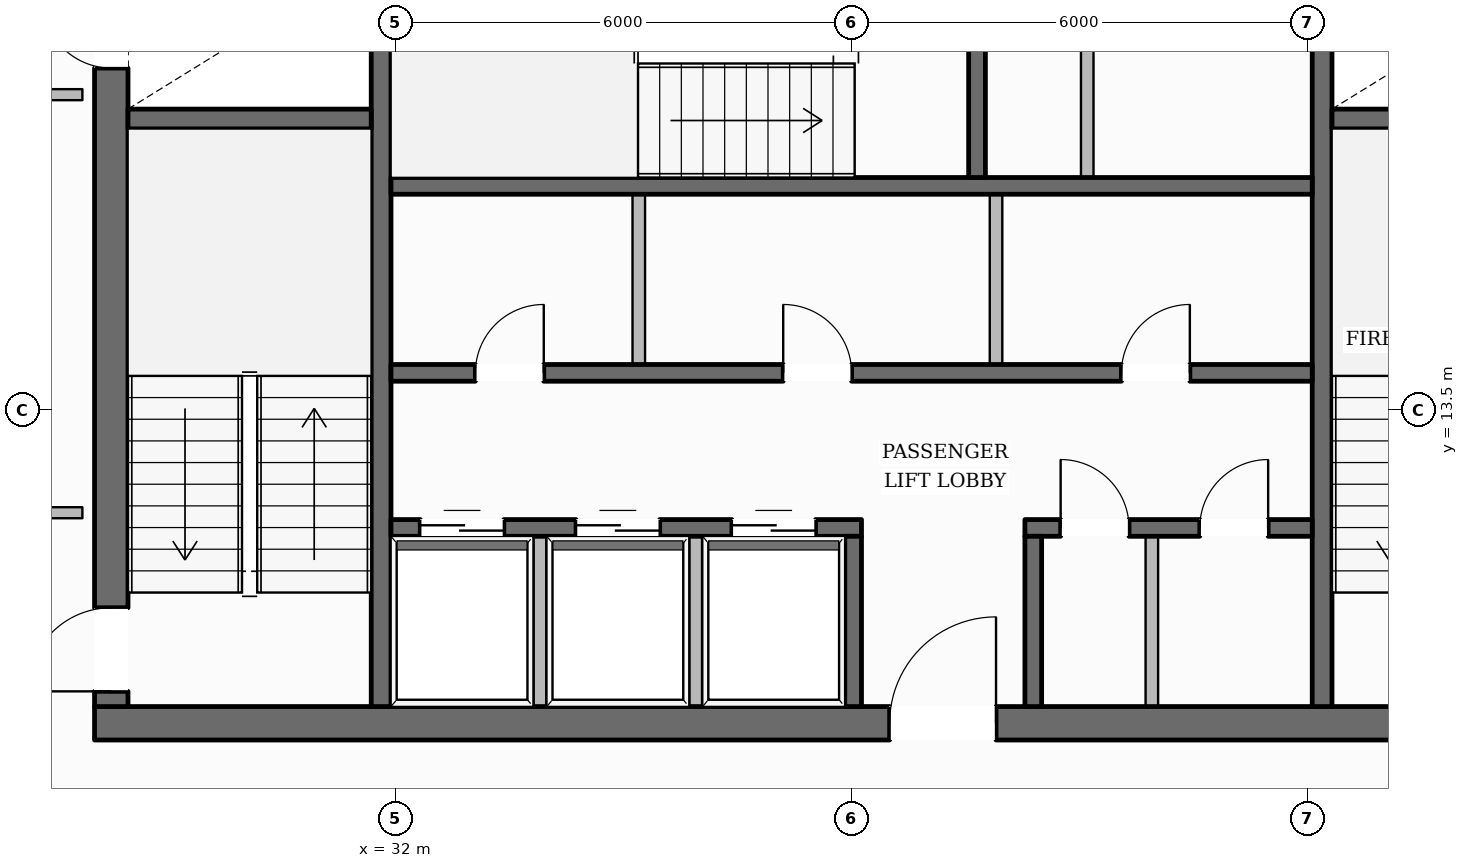
"""IFC4 building model, lengths in metres.
Left out: names, types, materials, properties, quantities, classifications, styles, units other than length and angle.
Written with IfcOpenShell. Run it as: python <this file> out.ifc"""

import sys

from ifc_helpers import new_model, si_unit, direction, frame, frame_2d, origin, place, context, subcontext, project, spatial, rectangle, extrude, element, fill, save


model = new_model("IFC4")
c1 = context("Model", 3, precision=1e-05, world=origin(), true_north=direction((0.0, 1.0)))
c2 = subcontext(c1, "Body", "Model", "MODEL_VIEW")
j1 = project(units=[si_unit("LENGTHUNIT", "METRE"), si_unit("PLANEANGLEUNIT", "RADIAN")], contexts=[c1])
p1 = place(None, origin())
s1 = spatial("IfcSite", under=j1, at=p1, CompositionType="ELEMENT")
p2 = place(p1, origin())
s2 = spatial("IfcBuilding", under=s1, at=p2, CompositionType="ELEMENT")
p3 = place(p2, frame((0.0, 0.0, 172.7)))
s3 = spatial("IfcBuildingStorey", under=s2, at=p3, CompositionType="ELEMENT", Elevation=172.7)
p4 = place(p3, frame((28.04, 9.38, 0.0), z_axis=(0.0, 0.0, 1.0), x_axis=(1.0, 0.0, 0.0)))
e1 = element("IfcWall", 1, at=p4, inside=s3, PredefinedType="SOLIDWALL", context=c2, shape_type="SweptSolid", body=[
    extrude(rectangle(XDim=19.92, YDim=0.44, at=frame_2d((9.96, 0.0))), origin(), (0.0, 0.0, 1.0), 3.6),
])
p5 = place(p4, frame((10.46, 0.0, 0.0)))
e2 = element("IfcOpeningElement", 2, at=p5, cuts=e1, PredefinedType="OPENING", context=c2, shape_type="SweptSolid", body=[
    extrude(rectangle(XDim=1.4, YDim=2.2, at=frame_2d((0.7, 1.1))), frame((0.0, 0.23, 0.0), z_axis=(0.0, -1.0, 0.0), x_axis=(1.0, 0.0, 0.0)), (0.0, 0.0, 1.0), 0.46),
])
p6 = place(p3, frame((28.26, 9.6, 0.0), z_axis=(0.0, 0.0, 1.0), x_axis=(0.0, 1.0, 0.0)))
e3 = element("IfcWall", 3, at=p6, inside=s3, PredefinedType="SOLIDWALL", context=c2, shape_type="SweptSolid", body=[
    extrude(rectangle(XDim=13.0, YDim=0.44, at=frame_2d((6.5, 0.0))), origin(), (0.0, 0.0, 1.0), 3.6),
])
p7 = place(p6, frame((0.2, 0.0, 0.0)))
e4 = element("IfcOpeningElement", 4, at=p7, cuts=e3, PredefinedType="OPENING", context=c2, shape_type="SweptSolid", body=[
    extrude(rectangle(XDim=1.1, YDim=2.15, at=frame_2d((0.55, 1.075))), frame((0.0, 0.23, 0.0), z_axis=(0.0, -1.0, 0.0), x_axis=(1.0, 0.0, 0.0)), (0.0, 0.0, 1.0), 0.46),
])
p8 = place(p6, frame((8.4, 0.0, 0.0)))
e5 = element("IfcOpeningElement", 5, at=p8, cuts=e3, PredefinedType="OPENING", context=c2, shape_type="SweptSolid", body=[
    extrude(rectangle(XDim=0.9, YDim=2.1, at=frame_2d((0.45, 1.05))), frame((0.0, 0.23, 0.0), z_axis=(0.0, -1.0, 0.0), x_axis=(1.0, 0.0, 0.0)), (0.0, 0.0, 1.0), 0.46),
])
p9 = place(p3, frame((31.81, 9.6, 0.0), z_axis=(0.0, 0.0, 1.0), x_axis=(0.0, 1.0, 0.0)))
e6 = element("IfcWall", 6, at=p9, inside=s3, PredefinedType="SHEAR", context=c2, shape_type="SweptSolid", body=[
    extrude(rectangle(XDim=13.0, YDim=0.26, at=frame_2d((6.5, 0.0))), origin(), (0.0, 0.0, 1.0), 3.6),
])
p10 = place(p9, frame((10.925, 0.0, 0.0)))
e7 = element("IfcOpeningElement", 7, at=p10, cuts=e6, PredefinedType="OPENING", context=c2, shape_type="SweptSolid", body=[
    extrude(rectangle(XDim=1.25, YDim=2.25, at=frame_2d((0.625, 1.125))), frame((0.0, 0.14, 0.0), z_axis=(0.0, -1.0, 0.0), x_axis=(1.0, 0.0, 0.0)), (0.0, 0.0, 1.0), 0.28),
])
p11 = place(p3, frame((44.19, 9.6, 0.0), z_axis=(0.0, 0.0, 1.0), x_axis=(0.0, 1.0, 0.0)))
e8 = element("IfcWall", 8, at=p11, inside=s3, PredefinedType="SHEAR", context=c2, shape_type="SweptSolid", body=[
    extrude(rectangle(XDim=13.0, YDim=0.26, at=frame_2d((6.5, 0.0))), origin(), (0.0, 0.0, 1.0), 3.6),
])
p12 = place(p11, frame((10.925, 0.0, 0.0)))
e9 = element("IfcOpeningElement", 9, at=p12, cuts=e8, PredefinedType="OPENING", context=c2, shape_type="SweptSolid", body=[
    extrude(rectangle(XDim=1.25, YDim=2.25, at=frame_2d((0.625, 1.125))), frame((0.0, 0.14, 0.0), z_axis=(0.0, -1.0, 0.0), x_axis=(1.0, 0.0, 0.0)), (0.0, 0.0, 1.0), 0.28),
])
for number, where, z_axis, x_axis in (
    (10, (28.48, 17.33, 0.0), (0.0, 0.0, 1.0), (1.0, 0.0, 0.0)),
    (11, (44.32, 17.33, 0.0), (0.0, 0.0, 1.0), (1.0, 0.0, 0.0)),
):
    element("IfcWall", number, at=place(p3, frame(where, z_axis=z_axis, x_axis=x_axis)), inside=s3, PredefinedType="SHEAR", context=c2, shape_type="SweptSolid", body=[
        extrude(rectangle(XDim=3.2, YDim=0.26, at=frame_2d((1.6, 0.0))), origin(), (0.0, 0.0, 1.0), 3.6),
    ])
p13 = place(p3, frame((31.94, 16.45, 0.0), z_axis=(0.0, 0.0, 1.0), x_axis=(1.0, 0.0, 0.0)))
e12 = element("IfcWall", 12, at=p13, inside=s3, PredefinedType="SOLIDWALL", context=c2, shape_type="SweptSolid", body=[
    extrude(rectangle(XDim=12.12, YDim=0.22, at=frame_2d((6.06, 0.0))), origin(), (0.0, 0.0, 1.0), 3.6),
])
p14 = place(p3, frame((39.65, 16.56, 0.0), z_axis=(0.0, 0.0, 1.0), x_axis=(0.0, 1.0, 0.0)))
e13 = element("IfcWall", 13, at=p14, inside=s3, PredefinedType="SOLIDWALL", context=c2, shape_type="SweptSolid", body=[
    extrude(rectangle(XDim=3.2, YDim=0.22, at=frame_2d((1.6, 0.0))), origin(), (0.0, 0.0, 1.0), 3.6),
])
p15 = place(p3, frame((31.94, 13.99, 0.0), z_axis=(0.0, 0.0, 1.0), x_axis=(1.0, 0.0, 0.0)))
e14 = element("IfcWall", 14, at=p15, inside=s3, PredefinedType="SOLIDWALL", context=c2, shape_type="SweptSolid", body=[
    extrude(rectangle(XDim=12.12, YDim=0.22, at=frame_2d((6.06, 0.0))), origin(), (0.0, 0.0, 1.0), 3.6),
])
p16 = place(p15, frame((1.11, 0.0, 0.0)))
e15 = element("IfcOpeningElement", 15, at=p16, cuts=e14, PredefinedType="OPENING", context=c2, shape_type="SweptSolid", body=[
    extrude(rectangle(XDim=0.9, YDim=2.1, at=frame_2d((0.45, 1.05))), frame((0.0, 0.12, 0.0), z_axis=(0.0, -1.0, 0.0), x_axis=(1.0, 0.0, 0.0)), (0.0, 0.0, 1.0), 0.24),
])
p17 = place(p15, frame((5.16, 0.0, 0.0)))
e16 = element("IfcOpeningElement", 16, at=p17, cuts=e14, PredefinedType="OPENING", context=c2, shape_type="SweptSolid", body=[
    extrude(rectangle(XDim=0.9, YDim=2.1, at=frame_2d((0.45, 1.05))), frame((0.0, 0.12, 0.0), z_axis=(0.0, -1.0, 0.0), x_axis=(1.0, 0.0, 0.0)), (0.0, 0.0, 1.0), 0.24),
])
p18 = place(p15, frame((9.61, 0.0, 0.0)))
e17 = element("IfcOpeningElement", 17, at=p18, cuts=e14, PredefinedType="OPENING", context=c2, shape_type="SweptSolid", body=[
    extrude(rectangle(XDim=0.9, YDim=2.1, at=frame_2d((0.45, 1.05))), frame((0.0, 0.12, 0.0), z_axis=(0.0, -1.0, 0.0), x_axis=(1.0, 0.0, 0.0)), (0.0, 0.0, 1.0), 0.24),
])
p19 = place(p3, frame((31.94, 11.95, 0.0), z_axis=(0.0, 0.0, 1.0), x_axis=(1.0, 0.0, 0.0)))
e18 = element("IfcWall", 18, at=p19, inside=s3, PredefinedType="SOLIDWALL", context=c2, shape_type="SweptSolid", body=[
    extrude(rectangle(XDim=6.19, YDim=0.22, at=frame_2d((3.095, 0.0))), origin(), (0.0, 0.0, 1.0), 3.6),
])
p20 = place(p19, frame((0.385, 0.0, 0.0)))
e19 = element("IfcOpeningElement", 19, at=p20, cuts=e18, PredefinedType="OPENING", context=c2, shape_type="SweptSolid", body=[
    extrude(rectangle(XDim=1.1, YDim=2.2, at=frame_2d((0.55, 1.1))), frame((0.0, 0.12, 0.0), z_axis=(0.0, -1.0, 0.0), x_axis=(1.0, 0.0, 0.0)), (0.0, 0.0, 1.0), 0.24),
])
p21 = place(p19, frame((2.435, 0.0, 0.0)))
e20 = element("IfcOpeningElement", 20, at=p21, cuts=e18, PredefinedType="OPENING", context=c2, shape_type="SweptSolid", body=[
    extrude(rectangle(XDim=1.1, YDim=2.2, at=frame_2d((0.55, 1.1))), frame((0.0, 0.12, 0.0), z_axis=(0.0, -1.0, 0.0), x_axis=(1.0, 0.0, 0.0)), (0.0, 0.0, 1.0), 0.24),
])
p22 = place(p19, frame((4.485, 0.0, 0.0)))
e21 = element("IfcOpeningElement", 21, at=p22, cuts=e18, PredefinedType="OPENING", context=c2, shape_type="SweptSolid", body=[
    extrude(rectangle(XDim=1.1, YDim=2.2, at=frame_2d((0.55, 1.1))), frame((0.0, 0.12, 0.0), z_axis=(0.0, -1.0, 0.0), x_axis=(1.0, 0.0, 0.0)), (0.0, 0.0, 1.0), 0.24),
])
p23 = place(p3, frame((40.28, 11.95, 0.0), z_axis=(0.0, 0.0, 1.0), x_axis=(1.0, 0.0, 0.0)))
e22 = element("IfcWall", 22, at=p23, inside=s3, PredefinedType="SOLIDWALL", context=c2, shape_type="SweptSolid", body=[
    extrude(rectangle(XDim=3.78, YDim=0.22, at=frame_2d((1.89, 0.0))), origin(), (0.0, 0.0, 1.0), 3.6),
])
p24 = place(p23, frame((0.47, 0.0, 0.0)))
e23 = element("IfcOpeningElement", 23, at=p24, cuts=e22, PredefinedType="OPENING", context=c2, shape_type="SweptSolid", body=[
    extrude(rectangle(XDim=0.9, YDim=2.1, at=frame_2d((0.45, 1.05))), frame((0.0, 0.12, 0.0), z_axis=(0.0, -1.0, 0.0), x_axis=(1.0, 0.0, 0.0)), (0.0, 0.0, 1.0), 0.24),
])
p25 = place(p23, frame((2.3, 0.0, 0.0)))
e24 = element("IfcOpeningElement", 24, at=p25, cuts=e22, PredefinedType="OPENING", context=c2, shape_type="SweptSolid", body=[
    extrude(rectangle(XDim=0.9, YDim=2.1, at=frame_2d((0.45, 1.05))), frame((0.0, 0.12, 0.0), z_axis=(0.0, -1.0, 0.0), x_axis=(1.0, 0.0, 0.0)), (0.0, 0.0, 1.0), 0.24),
])
for number, where, z_axis, x_axis in (
    (25, (38.02, 9.6, 0.0), (0.0, 0.0, 1.0), (0.0, 1.0, 0.0)),
    (26, (40.39, 9.6, 0.0), (0.0, 0.0, 1.0), (0.0, 1.0, 0.0)),
):
    element("IfcWall", number, at=place(p3, frame(where, z_axis=z_axis, x_axis=x_axis)), inside=s3, PredefinedType="SOLIDWALL", context=c2, shape_type="SweptSolid", body=[
        extrude(rectangle(XDim=2.24, YDim=0.22, at=frame_2d((1.12, 0.0))), origin(), (0.0, 0.0, 1.0), 3.6),
    ])
p26 = place(p3, frame((15.132, 12.224, 0.0), z_axis=(0.0, 0.0, 1.0), x_axis=(0.492438100446, 0.870347469249, 0.0)))
e27 = element("IfcWall", 27, at=p26, inside=s3, PredefinedType="STANDARD", context=c2, shape_type="SweptSolid", body=[
    extrude(rectangle(XDim=37.194, YDim=0.35, at=frame_2d((18.597, 0.0))), origin(), (0.0, 0.0, 1.0), 3.132),
])
p27 = place(p26, frame((32.967, 0.0, 0.65)))
e28 = element("IfcOpeningElement", 28, at=p27, cuts=e27, PredefinedType="OPENING", context=c2, shape_type="SweptSolid", body=[
    extrude(rectangle(XDim=1.45, YDim=1.75, at=frame_2d((0.725, 0.875))), frame((0.0, 0.185, 0.0), z_axis=(0.0, -1.0, 0.0), x_axis=(1.0, 0.0, 0.0)), (0.0, 0.0, 1.0), 0.37),
])
p28 = place(p26, frame((26.927, 0.0, 0.65)))
e29 = element("IfcOpeningElement", 29, at=p28, cuts=e27, PredefinedType="OPENING", context=c2, shape_type="SweptSolid", body=[
    extrude(rectangle(XDim=1.45, YDim=1.75, at=frame_2d((0.725, 0.875))), frame((0.0, 0.185, 0.0), z_axis=(0.0, -1.0, 0.0), x_axis=(1.0, 0.0, 0.0)), (0.0, 0.0, 1.0), 0.37),
])
p29 = place(p26, frame((14.848, 0.0, 0.65)))
e30 = element("IfcOpeningElement", 30, at=p29, cuts=e27, PredefinedType="OPENING", context=c2, shape_type="SweptSolid", body=[
    extrude(rectangle(XDim=1.45, YDim=1.75, at=frame_2d((0.725, 0.875))), frame((0.0, 0.185, 0.0), z_axis=(0.0, -1.0, 0.0), x_axis=(1.0, 0.0, 0.0)), (0.0, 0.0, 1.0), 0.37),
])
p30 = place(p26, frame((8.808, 0.0, 0.65)))
e31 = element("IfcOpeningElement", 31, at=p30, cuts=e27, PredefinedType="OPENING", context=c2, shape_type="SweptSolid", body=[
    extrude(rectangle(XDim=1.45, YDim=1.75, at=frame_2d((0.725, 0.875))), frame((0.0, 0.185, 0.0), z_axis=(0.0, -1.0, 0.0), x_axis=(1.0, 0.0, 0.0)), (0.0, 0.0, 1.0), 0.37),
])
p31 = place(p26, frame((2.769, 0.0, 0.65)))
e32 = element("IfcOpeningElement", 32, at=p31, cuts=e27, PredefinedType="OPENING", context=c2, shape_type="SweptSolid", body=[
    extrude(rectangle(XDim=1.45, YDim=1.75, at=frame_2d((0.725, 0.875))), frame((0.0, 0.185, 0.0), z_axis=(0.0, -1.0, 0.0), x_axis=(1.0, 0.0, 0.0)), (0.0, 0.0, 1.0), 0.37),
])
p32 = place(p3, frame((42.661, 44.531, 0.0), z_axis=(0.0, 0.0, 1.0), x_axis=(0.497996481168, -0.867179049991, 0.0)))
e33 = element("IfcWall", 33, at=p32, inside=s3, PredefinedType="STANDARD", context=c2, shape_type="SweptSolid", body=[
    extrude(rectangle(XDim=37.599, YDim=0.35, at=frame_2d((18.799, 0.0))), origin(), (0.0, 0.0, 1.0), 3.132),
])
p33 = place(p32, frame((33.346, 0.0, 0.65)))
e34 = element("IfcOpeningElement", 34, at=p33, cuts=e33, PredefinedType="OPENING", context=c2, shape_type="SweptSolid", body=[
    extrude(rectangle(XDim=1.45, YDim=1.75, at=frame_2d((0.725, 0.875))), frame((0.0, 0.185, 0.0), z_axis=(0.0, -1.0, 0.0), x_axis=(1.0, 0.0, 0.0)), (0.0, 0.0, 1.0), 0.37),
])
p34 = place(p32, frame((27.238, 0.0, 0.65)))
e35 = element("IfcOpeningElement", 35, at=p34, cuts=e33, PredefinedType="OPENING", context=c2, shape_type="SweptSolid", body=[
    extrude(rectangle(XDim=1.45, YDim=1.75, at=frame_2d((0.725, 0.875))), frame((0.0, 0.185, 0.0), z_axis=(0.0, -1.0, 0.0), x_axis=(1.0, 0.0, 0.0)), (0.0, 0.0, 1.0), 0.37),
])
p35 = place(p32, frame((15.021, 0.0, 0.65)))
e36 = element("IfcOpeningElement", 36, at=p35, cuts=e33, PredefinedType="OPENING", context=c2, shape_type="SweptSolid", body=[
    extrude(rectangle(XDim=1.45, YDim=1.75, at=frame_2d((0.725, 0.875))), frame((0.0, 0.185, 0.0), z_axis=(0.0, -1.0, 0.0), x_axis=(1.0, 0.0, 0.0)), (0.0, 0.0, 1.0), 0.37),
])
p36 = place(p32, frame((8.913, 0.0, 0.65)))
e37 = element("IfcOpeningElement", 37, at=p36, cuts=e33, PredefinedType="OPENING", context=c2, shape_type="SweptSolid", body=[
    extrude(rectangle(XDim=1.45, YDim=1.75, at=frame_2d((0.725, 0.875))), frame((0.0, 0.185, 0.0), z_axis=(0.0, -1.0, 0.0), x_axis=(1.0, 0.0, 0.0)), (0.0, 0.0, 1.0), 0.37),
])
p37 = place(p32, frame((2.805, 0.0, 0.65)))
e38 = element("IfcOpeningElement", 38, at=p37, cuts=e33, PredefinedType="OPENING", context=c2, shape_type="SweptSolid", body=[
    extrude(rectangle(XDim=1.45, YDim=1.75, at=frame_2d((0.725, 0.875))), frame((0.0, 0.185, 0.0), z_axis=(0.0, -1.0, 0.0), x_axis=(1.0, 0.0, 0.0)), (0.0, 0.0, 1.0), 0.37),
])
for number, where, z_axis, x_axis in (
    (39, (33.9, 9.52, 0.0), (0.0, 0.0, 1.0), (0.0, 1.0, 0.0)),
    (40, (35.95, 9.52, 0.0), (0.0, 0.0, 1.0), (0.0, 1.0, 0.0)),
):
    element("IfcWall", number, at=place(p3, frame(where, z_axis=z_axis, x_axis=x_axis)), inside=s3, PredefinedType="PARTITIONING", context=c2, shape_type="SweptSolid", body=[
        extrude(rectangle(XDim=2.32, YDim=0.165, at=frame_2d((1.16, 0.0))), origin(), (0.0, 0.0, 1.0), 3.6),
    ])
for number, where, z_axis, x_axis in (
    (41, (35.2, 14.1, 0.0), (0.0, 0.0, 1.0), (0.0, 1.0, 0.0)),
    (42, (39.9, 14.1, 0.0), (0.0, 0.0, 1.0), (0.0, 1.0, 0.0)),
):
    element("IfcWall", number, at=place(p3, frame(where, z_axis=z_axis, x_axis=x_axis)), inside=s3, PredefinedType="PARTITIONING", context=c2, shape_type="SweptSolid", body=[
        extrude(rectangle(XDim=2.24, YDim=0.165, at=frame_2d((1.12, 0.0))), origin(), (0.0, 0.0, 1.0), 3.6),
    ])
p38 = place(p3, frame((41.1, 16.56, 0.0), z_axis=(0.0, 0.0, 1.0), x_axis=(0.0, 1.0, 0.0)))
e43 = element("IfcWall", 43, at=p38, inside=s3, PredefinedType="PARTITIONING", context=c2, shape_type="SweptSolid", body=[
    extrude(rectangle(XDim=3.2, YDim=0.165, at=frame_2d((1.6, 0.0))), origin(), (0.0, 0.0, 1.0), 3.6),
])
p39 = place(p3, frame((41.95, 9.52, 0.0), z_axis=(0.0, 0.0, 1.0), x_axis=(0.0, 1.0, 0.0)))
e44 = element("IfcWall", 44, at=p39, inside=s3, PredefinedType="PARTITIONING", context=c2, shape_type="SweptSolid", body=[
    extrude(rectangle(XDim=2.32, YDim=0.165, at=frame_2d((1.16, 0.0))), origin(), (0.0, 0.0, 1.0), 3.6),
])
p40 = place(p3, frame((27.88, 17.65, 0.0), z_axis=(0.0, 0.0, 1.0), x_axis=(-1.0, 0.0, 0.0)))
e45 = element("IfcWall", 45, at=p40, inside=s3, PredefinedType="PARTITIONING", context=c2, shape_type="SweptSolid", body=[
    extrude(rectangle(XDim=1.82, YDim=0.145, at=frame_2d((0.91, 0.0))), origin(), (0.0, 0.0, 1.0), 3.141),
])
p41 = place(p3, frame((26.06, 12.15, 0.0), z_axis=(0.0, 0.0, 1.0), x_axis=(1.0, 0.0, 0.0)))
e46 = element("IfcWall", 46, at=p41, inside=s3, PredefinedType="PARTITIONING", context=c2, shape_type="SweptSolid", body=[
    extrude(rectangle(XDim=1.82, YDim=0.145, at=frame_2d((0.91, 0.0))), origin(), (0.0, 0.0, 1.0), 3.6),
])
p42 = place(p7, origin())
e47 = element("IfcDoor", 47, at=p42, inside=s3, OperationType="SINGLE_SWING_LEFT", PredefinedType="DOOR", context=c2, shape_type="SweptSolid", body=[
    extrude(rectangle(XDim=1.1, YDim=2.15, at=frame_2d((0.55, 1.075))), frame((0.0, 0.025, 0.0), z_axis=(0.0, -1.0, 0.0), x_axis=(1.0, 0.0, 0.0)), (0.0, 0.0, 1.0), 0.05),
])
fill(e4, e47)
p43 = place(p8, origin())
e48 = element("IfcDoor", 48, at=p43, inside=s3, OperationType="SINGLE_SWING_RIGHT", PredefinedType="DOOR", context=c2, shape_type="SweptSolid", body=[
    extrude(rectangle(XDim=0.9, YDim=2.1, at=frame_2d((0.45, 1.05))), frame((0.0, 0.025, 0.0), z_axis=(0.0, -1.0, 0.0), x_axis=(1.0, 0.0, 0.0)), (0.0, 0.0, 1.0), 0.05),
])
fill(e5, e48)
p44 = place(p5, origin())
e49 = element("IfcDoor", 49, at=p44, inside=s3, OperationType="SINGLE_SWING_RIGHT", PredefinedType="DOOR", context=c2, shape_type="SweptSolid", body=[
    extrude(rectangle(XDim=1.4, YDim=2.2, at=frame_2d((0.7, 1.1))), frame((0.0, 0.025, 0.0), z_axis=(0.0, -1.0, 0.0), x_axis=(1.0, 0.0, 0.0)), (0.0, 0.0, 1.0), 0.05),
])
fill(e2, e49)
p45 = place(p20, origin())
e50 = element("IfcDoor", 50, at=p45, inside=s3, OperationType="DOUBLE_DOOR_SLIDING", PredefinedType="DOOR", context=c2, shape_type="SweptSolid", body=[
    extrude(rectangle(XDim=1.1, YDim=2.2, at=frame_2d((0.55, 1.1))), frame((0.0, 0.025, 0.0), z_axis=(0.0, -1.0, 0.0), x_axis=(1.0, 0.0, 0.0)), (0.0, 0.0, 1.0), 0.05),
])
fill(e19, e50)
p46 = place(p21, origin())
e51 = element("IfcDoor", 51, at=p46, inside=s3, OperationType="DOUBLE_DOOR_SLIDING", PredefinedType="DOOR", context=c2, shape_type="SweptSolid", body=[
    extrude(rectangle(XDim=1.1, YDim=2.2, at=frame_2d((0.55, 1.1))), frame((0.0, 0.025, 0.0), z_axis=(0.0, -1.0, 0.0), x_axis=(1.0, 0.0, 0.0)), (0.0, 0.0, 1.0), 0.05),
])
fill(e20, e51)
p47 = place(p22, origin())
e52 = element("IfcDoor", 52, at=p47, inside=s3, OperationType="DOUBLE_DOOR_SLIDING", PredefinedType="DOOR", context=c2, shape_type="SweptSolid", body=[
    extrude(rectangle(XDim=1.1, YDim=2.2, at=frame_2d((0.55, 1.1))), frame((0.0, 0.025, 0.0), z_axis=(0.0, -1.0, 0.0), x_axis=(1.0, 0.0, 0.0)), (0.0, 0.0, 1.0), 0.05),
])
fill(e21, e52)
p48 = place(p16, origin())
e53 = element("IfcDoor", 53, at=p48, inside=s3, OperationType="SINGLE_SWING_RIGHT", PredefinedType="DOOR", context=c2, shape_type="SweptSolid", body=[
    extrude(rectangle(XDim=0.9, YDim=2.1, at=frame_2d((0.45, 1.05))), frame((0.0, 0.025, 0.0), z_axis=(0.0, -1.0, 0.0), x_axis=(1.0, 0.0, 0.0)), (0.0, 0.0, 1.0), 0.05),
])
fill(e15, e53)
p49 = place(p17, origin())
e54 = element("IfcDoor", 54, at=p49, inside=s3, OperationType="SINGLE_SWING_LEFT", PredefinedType="DOOR", context=c2, shape_type="SweptSolid", body=[
    extrude(rectangle(XDim=0.9, YDim=2.1, at=frame_2d((0.45, 1.05))), frame((0.0, 0.025, 0.0), z_axis=(0.0, -1.0, 0.0), x_axis=(1.0, 0.0, 0.0)), (0.0, 0.0, 1.0), 0.05),
])
fill(e16, e54)
p50 = place(p18, origin())
e55 = element("IfcDoor", 55, at=p50, inside=s3, OperationType="SINGLE_SWING_RIGHT", PredefinedType="DOOR", context=c2, shape_type="SweptSolid", body=[
    extrude(rectangle(XDim=0.9, YDim=2.1, at=frame_2d((0.45, 1.05))), frame((0.0, 0.025, 0.0), z_axis=(0.0, -1.0, 0.0), x_axis=(1.0, 0.0, 0.0)), (0.0, 0.0, 1.0), 0.05),
])
fill(e17, e55)
p51 = place(p24, origin())
e56 = element("IfcDoor", 56, at=p51, inside=s3, OperationType="SINGLE_SWING_LEFT", PredefinedType="DOOR", context=c2, shape_type="SweptSolid", body=[
    extrude(rectangle(XDim=0.9, YDim=2.1, at=frame_2d((0.45, 1.05))), frame((0.0, 0.025, 0.0), z_axis=(0.0, -1.0, 0.0), x_axis=(1.0, 0.0, 0.0)), (0.0, 0.0, 1.0), 0.05),
])
fill(e23, e56)
p52 = place(p25, origin())
e57 = element("IfcDoor", 57, at=p52, inside=s3, OperationType="SINGLE_SWING_RIGHT", PredefinedType="DOOR", context=c2, shape_type="SweptSolid", body=[
    extrude(rectangle(XDim=0.9, YDim=2.1, at=frame_2d((0.45, 1.05))), frame((0.0, 0.025, 0.0), z_axis=(0.0, -1.0, 0.0), x_axis=(1.0, 0.0, 0.0)), (0.0, 0.0, 1.0), 0.05),
])
fill(e24, e57)
save(model, sys.argv[1])
